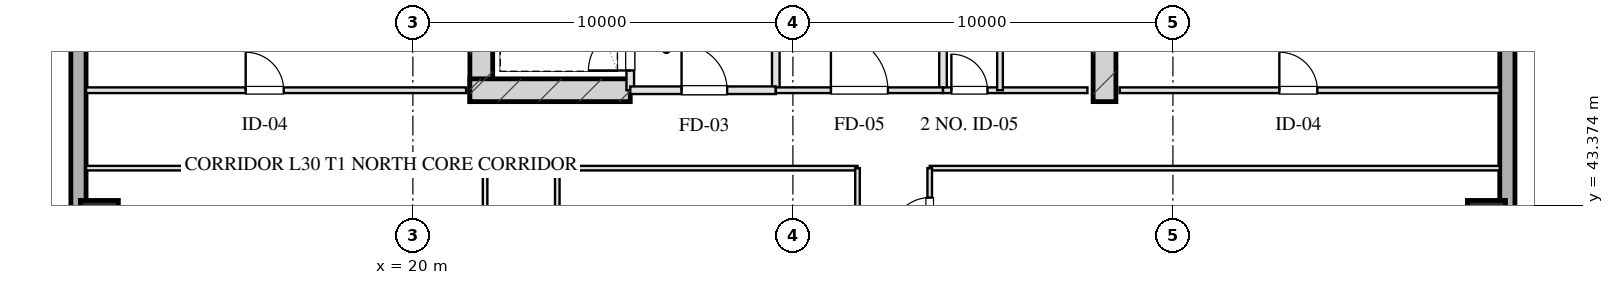
"""IFC4 building model, lengths in metres.
Left out: names, types, materials, properties, quantities, classifications, styles, units other than length and angle.
Written with IfcOpenShell. Run it as: python <this file> out.ifc"""

import sys

from ifc_helpers import new_model, si_unit, direction, frame, frame_2d, origin, origin_2d, place, context, subcontext, project, spatial, rectangle, hollow_rectangle, extrude, element, fill, save


model = new_model("IFC4")
c1 = context("Model", 3, precision=1e-05, world=origin(), true_north=direction((0.0, 1.0)))
c2 = subcontext(c1, "Body", "Model", "MODEL_VIEW")
j1 = project(units=[si_unit("LENGTHUNIT", "METRE"), si_unit("PLANEANGLEUNIT", "RADIAN")], contexts=[c1])
p1 = place(None, origin())
s1 = spatial("IfcSite", under=j1, at=p1, CompositionType="ELEMENT")
p2 = place(p1, origin())
s2 = spatial("IfcBuilding", under=s1, at=p2, CompositionType="ELEMENT")
p3 = place(p2, frame((0.0, 0.0, 117.3)))
s3 = spatial("IfcBuildingStorey", under=s2, at=p3, CompositionType="ELEMENT", Elevation=117.3)
for number, where, z_axis, x_axis in (
    (1, (21.8, 46.1, 0.0), (0.0, 0.0, 1.0), (0.0, 1.0, 0.0)),
    (2, (38.2, 46.1, 0.0), (0.0, 0.0, 1.0), (0.0, 1.0, 0.0)),
):
    element("IfcWall", number, at=place(p3, frame(where, z_axis=z_axis, x_axis=x_axis)), inside=s3, PredefinedType="SHEAR", context=c2, shape_type="SweptSolid", body=[
        extrude(rectangle(XDim=9.48, YDim=0.6, at=frame_2d((4.74, 0.0))), origin(), (0.0, 0.0, 1.0), 3.45),
    ])
p4 = place(p3, frame((21.5, 46.4, 0.0), z_axis=(0.0, 0.0, 1.0), x_axis=(1.0, 0.0, 0.0)))
e3 = element("IfcWall", 3, at=p4, inside=s3, PredefinedType="SHEAR", context=c2, shape_type="SweptSolid", body=[
    extrude(rectangle(XDim=4.22, YDim=0.6, at=frame_2d((2.11, 0.0))), origin(), (0.0, 0.0, 1.0), 3.45),
])
for number, where, z_axis, x_axis in (
    (4, (11.75, 43.0, 0.0), (0.0, 0.0, 1.0), (1.0, 0.0, 0.0)),
    (5, (48.25, 43.0, 0.0), (0.0, 0.0, 1.0), (1.0, 0.0, 0.0)),
):
    element("IfcColumn", number, at=place(p3, frame(where, z_axis=z_axis, x_axis=x_axis)), inside=s3, PredefinedType="COLUMN", context=c2, shape_type="SweptSolid", body=[
        extrude(hollow_rectangle(XDim=1.0, YDim=1.0, WallThickness=0.036, at=origin_2d()), origin(), (0.0, 0.0, 1.0), 3.451),
    ])
p5 = place(p3, frame((11.2, 9.0, 0.0), z_axis=(0.0, 0.0, 1.0), x_axis=(0.0, 1.0, 0.0)))
e6 = element("IfcWall", 6, at=p5, inside=s3, PredefinedType="SOLIDWALL", context=c2, shape_type="SweptSolid", body=[
    extrude(rectangle(XDim=50.0, YDim=0.4, at=frame_2d((25.0, 0.0))), origin(), (0.0, 0.0, 1.0), 2.61),
])
p6 = place(p5, frame((17.4, 0.0, 0.75)))
e7 = element("IfcOpeningElement", 7, at=p6, cuts=e6, PredefinedType="OPENING", context=c2, shape_type="SweptSolid", body=[
    extrude(rectangle(XDim=2.4, YDim=1.46, at=frame_2d((1.2, 0.73))), frame((0.0, 0.21, 0.0), z_axis=(0.0, -1.0, 0.0), x_axis=(1.0, 0.0, 0.0)), (0.0, 0.0, 1.0), 0.42),
])
p7 = place(p5, frame((30.2, 0.0, 0.75)))
e8 = element("IfcOpeningElement", 8, at=p7, cuts=e6, PredefinedType="OPENING", context=c2, shape_type="SweptSolid", body=[
    extrude(rectangle(XDim=2.4, YDim=1.46, at=frame_2d((1.2, 0.73))), frame((0.0, 0.21, 0.0), z_axis=(0.0, -1.0, 0.0), x_axis=(1.0, 0.0, 0.0)), (0.0, 0.0, 1.0), 0.42),
])
p8 = place(p3, frame((48.8, 59.0, 0.0), z_axis=(0.0, 0.0, 1.0), x_axis=(0.0, -1.0, 0.0)))
e9 = element("IfcWall", 9, at=p8, inside=s3, PredefinedType="SOLIDWALL", context=c2, shape_type="SweptSolid", body=[
    extrude(rectangle(XDim=50.0, YDim=0.4, at=frame_2d((25.0, 0.0))), origin(), (0.0, 0.0, 1.0), 2.61),
])
p9 = place(p8, frame((21.2, 0.0, 0.75)))
e10 = element("IfcOpeningElement", 10, at=p9, cuts=e9, PredefinedType="OPENING", context=c2, shape_type="SweptSolid", body=[
    extrude(rectangle(XDim=2.4, YDim=1.46, at=frame_2d((1.2, 0.73))), frame((0.0, 0.21, 0.0), z_axis=(0.0, -1.0, 0.0), x_axis=(1.0, 0.0, 0.0)), (0.0, 0.0, 1.0), 0.42),
])
p10 = place(p3, frame((25.72, 46.4, 0.0), z_axis=(0.0, 0.0, 1.0), x_axis=(0.0, 1.0, 0.0)))
e11 = element("IfcWall", 11, at=p10, inside=s3, PredefinedType="PARTITIONING", context=c2, shape_type="SweptSolid", body=[
    extrude(rectangle(XDim=1.9, YDim=0.2, at=frame_2d((0.95, 0.0))), origin(), (0.0, 0.0, 1.0), 3.175),
])
p11 = place(p10, frame((0.52, 0.0, 0.0)))
e12 = element("IfcOpeningElement", 12, at=p11, cuts=e11, PredefinedType="OPENING", context=c2, shape_type="SweptSolid", body=[
    extrude(rectangle(XDim=1.1, YDim=2.05, at=frame_2d((0.55, 1.025))), frame((0.0, 0.11, 0.0), z_axis=(0.0, -1.0, 0.0), x_axis=(1.0, 0.0, 0.0)), (0.0, 0.0, 1.0), 0.22),
])
p12 = place(p3, frame((29.55, 46.4, 0.0), z_axis=(0.0, 0.0, 1.0), x_axis=(0.0, 1.0, 0.0)))
e13 = element("IfcWall", 13, at=p12, inside=s3, PredefinedType="PARTITIONING", context=c2, shape_type="SweptSolid", body=[
    extrude(rectangle(XDim=8.43, YDim=0.2, at=frame_2d((4.215, 0.0))), origin(), (0.0, 0.0, 1.0), 3.175),
])
p13 = place(p3, frame((25.72, 46.4, 0.0), z_axis=(0.0, 0.0, 1.0), x_axis=(1.0, 0.0, 0.0)))
e14 = element("IfcWall", 14, at=p13, inside=s3, PredefinedType="PARTITIONING", context=c2, shape_type="SweptSolid", body=[
    extrude(rectangle(XDim=3.83, YDim=0.2, at=frame_2d((1.915, 0.0))), origin(), (0.0, 0.0, 1.0), 3.175),
])
p14 = place(p13, frame((1.35, 0.0, 0.0)))
e15 = element("IfcOpeningElement", 15, at=p14, cuts=e14, PredefinedType="OPENING", context=c2, shape_type="SweptSolid", body=[
    extrude(rectangle(XDim=1.2, YDim=2.05, at=frame_2d((0.6, 1.025))), frame((0.0, 0.11, 0.0), z_axis=(0.0, -1.0, 0.0), x_axis=(1.0, 0.0, 0.0)), (0.0, 0.0, 1.0), 0.22),
])
p15 = place(p3, frame((33.95, 46.4, 0.0), z_axis=(0.0, 0.0, 1.0), x_axis=(0.0, 1.0, 0.0)))
e16 = element("IfcWall", 16, at=p15, inside=s3, PredefinedType="PARTITIONING", context=c2, shape_type="SweptSolid", body=[
    extrude(rectangle(XDim=8.43, YDim=0.2, at=frame_2d((4.215, 0.0))), origin(), (0.0, 0.0, 1.0), 3.175),
])
p16 = place(p3, frame((29.55, 46.4, 0.0), z_axis=(0.0, 0.0, 1.0), x_axis=(1.0, 0.0, 0.0)))
e17 = element("IfcWall", 17, at=p16, inside=s3, PredefinedType="PARTITIONING", context=c2, shape_type="SweptSolid", body=[
    extrude(rectangle(XDim=4.4, YDim=0.15, at=frame_2d((2.2, 0.0))), origin(), (0.0, 0.0, 1.0), 3.175),
])
p17 = place(p16, frame((1.45, 0.0, 0.0)))
e18 = element("IfcOpeningElement", 18, at=p17, cuts=e17, PredefinedType="OPENING", context=c2, shape_type="SweptSolid", body=[
    extrude(rectangle(XDim=1.5, YDim=2.05, at=frame_2d((0.75, 1.025))), frame((0.0, 0.085, 0.0), z_axis=(0.0, -1.0, 0.0), x_axis=(1.0, 0.0, 0.0)), (0.0, 0.0, 1.0), 0.17),
])
p18 = place(p3, frame((33.95, 46.4, 0.0), z_axis=(0.0, 0.0, 1.0), x_axis=(1.0, 0.0, 0.0)))
e19 = element("IfcWall", 19, at=p18, inside=s3, PredefinedType="PARTITIONING", context=c2, shape_type="SweptSolid", body=[
    extrude(rectangle(XDim=3.8, YDim=0.15, at=frame_2d((1.9, 0.0))), origin(), (0.0, 0.0, 1.0), 3.175),
])
p19 = place(p18, frame((0.22, 0.0, 0.0)))
e20 = element("IfcOpeningElement", 20, at=p19, cuts=e19, PredefinedType="OPENING", context=c2, shape_type="SweptSolid", body=[
    extrude(rectangle(XDim=0.95, YDim=2.05, at=frame_2d((0.475, 1.025))), frame((0.0, 0.085, 0.0), z_axis=(0.0, -1.0, 0.0), x_axis=(1.0, 0.0, 0.0)), (0.0, 0.0, 1.0), 0.17),
])
p20 = place(p3, frame((35.45, 46.4, 0.0), z_axis=(0.0, 0.0, 1.0), x_axis=(0.0, 1.0, 0.0)))
e21 = element("IfcWall", 21, at=p20, inside=s3, PredefinedType="PARTITIONING", context=c2, shape_type="SweptSolid", body=[
    extrude(rectangle(XDim=8.43, YDim=0.15, at=frame_2d((4.215, 0.0))), origin(), (0.0, 0.0, 1.0), 2.765),
])
p21 = place(p20, frame((2.55, 0.0, 0.0)))
e22 = element("IfcOpeningElement", 22, at=p21, cuts=e21, PredefinedType="OPENING", context=c2, shape_type="SweptSolid", body=[
    extrude(rectangle(XDim=0.95, YDim=2.05, at=frame_2d((0.475, 1.025))), frame((0.0, 0.085, 0.0), z_axis=(0.0, -1.0, 0.0), x_axis=(1.0, 0.0, 0.0)), (0.0, 0.0, 1.0), 0.17),
])
p22 = place(p20, frame((4.7, 0.0, 0.0)))
e23 = element("IfcOpeningElement", 23, at=p22, cuts=e21, PredefinedType="OPENING", context=c2, shape_type="SweptSolid", body=[
    extrude(rectangle(XDim=0.9, YDim=2.05, at=frame_2d((0.45, 1.025))), frame((0.0, 0.085, 0.0), z_axis=(0.0, -1.0, 0.0), x_axis=(1.0, 0.0, 0.0)), (0.0, 0.0, 1.0), 0.17),
])
p23 = place(p20, frame((6.8, 0.0, 0.0)))
e24 = element("IfcOpeningElement", 24, at=p23, cuts=e21, PredefinedType="OPENING", context=c2, shape_type="SweptSolid", body=[
    extrude(rectangle(XDim=0.9, YDim=2.05, at=frame_2d((0.45, 1.025))), frame((0.0, 0.085, 0.0), z_axis=(0.0, -1.0, 0.0), x_axis=(1.0, 0.0, 0.0)), (0.0, 0.0, 1.0), 0.17),
])
p24 = place(p3, frame((11.4, 46.4, 0.0), z_axis=(0.0, 0.0, 1.0), x_axis=(1.0, 0.0, 0.0)))
e25 = element("IfcWall", 25, at=p24, inside=s3, PredefinedType="PARTITIONING", context=c2, shape_type="SweptSolid", body=[
    extrude(rectangle(XDim=10.0, YDim=0.15, at=frame_2d((5.0, 0.0))), origin(), (0.0, 0.0, 1.0), 3.175),
])
p25 = place(p24, frame((4.2, 0.0, 0.0)))
e26 = element("IfcOpeningElement", 26, at=p25, cuts=e25, PredefinedType="OPENING", context=c2, shape_type="SweptSolid", body=[
    extrude(rectangle(XDim=1.0, YDim=2.05, at=frame_2d((0.5, 1.025))), frame((0.0, 0.085, 0.0), z_axis=(0.0, -1.0, 0.0), x_axis=(1.0, 0.0, 0.0)), (0.0, 0.0, 1.0), 0.17),
])
p26 = place(p3, frame((38.6, 46.4, 0.0), z_axis=(0.0, 0.0, 1.0), x_axis=(1.0, 0.0, 0.0)))
e27 = element("IfcWall", 27, at=p26, inside=s3, PredefinedType="PARTITIONING", context=c2, shape_type="SweptSolid", body=[
    extrude(rectangle(XDim=10.0, YDim=0.15, at=frame_2d((5.0, 0.0))), origin(), (0.0, 0.0, 1.0), 3.175),
])
p27 = place(p26, frame((4.2, 0.0, 0.0)))
e28 = element("IfcOpeningElement", 28, at=p27, cuts=e27, PredefinedType="OPENING", context=c2, shape_type="SweptSolid", body=[
    extrude(rectangle(XDim=1.0, YDim=2.05, at=frame_2d((0.5, 1.025))), frame((0.0, 0.085, 0.0), z_axis=(0.0, -1.0, 0.0), x_axis=(1.0, 0.0, 0.0)), (0.0, 0.0, 1.0), 0.17),
])
p28 = place(p3, frame((11.4, 44.35, 0.0), z_axis=(0.0, 0.0, 1.0), x_axis=(1.0, 0.0, 0.0)))
e29 = element("IfcWall", 29, at=p28, inside=s3, PredefinedType="PARTITIONING", context=c2, shape_type="SweptSolid", body=[
    extrude(rectangle(XDim=10.5, YDim=0.12, at=frame_2d((5.25, 0.0))), origin(), (0.0, 0.0, 1.0), 3.175),
])
p29 = place(p3, frame((23.8, 44.35, 0.0), z_axis=(0.0, 0.0, 1.0), x_axis=(1.0, 0.0, 0.0)))
e30 = element("IfcWall", 30, at=p29, inside=s3, PredefinedType="PARTITIONING", context=c2, shape_type="SweptSolid", body=[
    extrude(rectangle(XDim=7.9, YDim=0.12, at=frame_2d((3.95, 0.0))), origin(), (0.0, 0.0, 1.0), 3.175),
])
p30 = place(p3, frame((33.6, 44.35, 0.0), z_axis=(0.0, 0.0, 1.0), x_axis=(1.0, 0.0, 0.0)))
e31 = element("IfcWall", 31, at=p30, inside=s3, PredefinedType="PARTITIONING", context=c2, shape_type="SweptSolid", body=[
    extrude(rectangle(XDim=15.0, YDim=0.12, at=frame_2d((7.5, 0.0))), origin(), (0.0, 0.0, 1.0), 3.175),
])
p31 = place(p3, frame((21.9, 23.65, 0.0), z_axis=(0.0, 0.0, 1.0), x_axis=(0.0, 1.0, 0.0)))
e32 = element("IfcWall", 32, at=p31, inside=s3, PredefinedType="PARTITIONING", context=c2, shape_type="SweptSolid", body=[
    extrude(rectangle(XDim=20.7, YDim=0.12, at=frame_2d((10.35, 0.0))), origin(), (0.0, 0.0, 1.0), 3.175),
])
p32 = place(p31, frame((2.675, 0.0, 0.0)))
e33 = element("IfcOpeningElement", 33, at=p32, cuts=e32, PredefinedType="OPENING", context=c2, shape_type="SweptSolid", body=[
    extrude(rectangle(XDim=1.05, YDim=2.05, at=frame_2d((0.525, 1.025))), frame((0.0, 0.07, 0.0), z_axis=(0.0, -1.0, 0.0), x_axis=(1.0, 0.0, 0.0)), (0.0, 0.0, 1.0), 0.14),
])
p33 = place(p31, frame((9.85, 0.0, 0.0)))
e34 = element("IfcOpeningElement", 34, at=p33, cuts=e32, PredefinedType="OPENING", context=c2, shape_type="SweptSolid", body=[
    extrude(rectangle(XDim=1.0, YDim=2.05, at=frame_2d((0.5, 1.025))), frame((0.0, 0.07, 0.0), z_axis=(0.0, -1.0, 0.0), x_axis=(1.0, 0.0, 0.0)), (0.0, 0.0, 1.0), 0.14),
])
p34 = place(p31, frame((17.025, 0.0, 0.0)))
e35 = element("IfcOpeningElement", 35, at=p34, cuts=e32, PredefinedType="OPENING", context=c2, shape_type="SweptSolid", body=[
    extrude(rectangle(XDim=1.0, YDim=2.05, at=frame_2d((0.5, 1.025))), frame((0.0, 0.07, 0.0), z_axis=(0.0, -1.0, 0.0), x_axis=(1.0, 0.0, 0.0)), (0.0, 0.0, 1.0), 0.14),
])
p35 = place(p3, frame((23.8, 23.65, 0.0), z_axis=(0.0, 0.0, 1.0), x_axis=(0.0, 1.0, 0.0)))
e36 = element("IfcWall", 36, at=p35, inside=s3, PredefinedType="PARTITIONING", context=c2, shape_type="SweptSolid", body=[
    extrude(rectangle(XDim=20.7, YDim=0.12, at=frame_2d((10.35, 0.0))), origin(), (0.0, 0.0, 1.0), 3.175),
])
p36 = place(p35, frame((2.857, 0.0, 0.0)))
e37 = element("IfcOpeningElement", 37, at=p36, cuts=e36, PredefinedType="OPENING", context=c2, shape_type="SweptSolid", body=[
    extrude(rectangle(XDim=1.1, YDim=2.05, at=frame_2d((0.55, 1.025))), frame((0.0, 0.07, 0.0), z_axis=(0.0, -1.0, 0.0), x_axis=(1.0, 0.0, 0.0)), (0.0, 0.0, 1.0), 0.14),
])
p37 = place(p35, frame((17.189, 0.0, 0.0)))
e38 = element("IfcOpeningElement", 38, at=p37, cuts=e36, PredefinedType="OPENING", context=c2, shape_type="SweptSolid", body=[
    extrude(rectangle(XDim=1.1, YDim=2.05, at=frame_2d((0.55, 1.025))), frame((0.0, 0.07, 0.0), z_axis=(0.0, -1.0, 0.0), x_axis=(1.0, 0.0, 0.0)), (0.0, 0.0, 1.0), 0.14),
])
p38 = place(p3, frame((31.7, 23.65, 0.0), z_axis=(0.0, 0.0, 1.0), x_axis=(0.0, 1.0, 0.0)))
e39 = element("IfcWall", 39, at=p38, inside=s3, PredefinedType="PARTITIONING", context=c2, shape_type="SweptSolid", body=[
    extrude(rectangle(XDim=20.7, YDim=0.12, at=frame_2d((10.35, 0.0))), origin(), (0.0, 0.0, 1.0), 3.175),
])
p39 = place(p38, frame((9.696, 0.0, 0.0)))
e40 = element("IfcOpeningElement", 40, at=p39, cuts=e39, PredefinedType="OPENING", context=c2, shape_type="SweptSolid", body=[
    extrude(rectangle(XDim=1.1, YDim=2.05, at=frame_2d((0.55, 1.025))), frame((0.0, 0.07, 0.0), z_axis=(0.0, -1.0, 0.0), x_axis=(1.0, 0.0, 0.0)), (0.0, 0.0, 1.0), 0.14),
])
p40 = place(p3, frame((33.6, 23.65, 0.0), z_axis=(0.0, 0.0, 1.0), x_axis=(0.0, 1.0, 0.0)))
e41 = element("IfcWall", 41, at=p40, inside=s3, PredefinedType="PARTITIONING", context=c2, shape_type="SweptSolid", body=[
    extrude(rectangle(XDim=20.7, YDim=0.12, at=frame_2d((10.35, 0.0))), origin(), (0.0, 0.0, 1.0), 3.175),
])
p41 = place(p40, frame((0.775, 0.0, 0.0)))
e42 = element("IfcOpeningElement", 42, at=p41, cuts=e41, PredefinedType="OPENING", context=c2, shape_type="SweptSolid", body=[
    extrude(rectangle(XDim=1.0, YDim=2.05, at=frame_2d((0.5, 1.025))), frame((0.0, 0.07, 0.0), z_axis=(0.0, -1.0, 0.0), x_axis=(1.0, 0.0, 0.0)), (0.0, 0.0, 1.0), 0.14),
])
p42 = place(p40, frame((3.95, 0.0, 0.0)))
e43 = element("IfcOpeningElement", 43, at=p42, cuts=e41, PredefinedType="OPENING", context=c2, shape_type="SweptSolid", body=[
    extrude(rectangle(XDim=1.05, YDim=2.05, at=frame_2d((0.525, 1.025))), frame((0.0, 0.07, 0.0), z_axis=(0.0, -1.0, 0.0), x_axis=(1.0, 0.0, 0.0)), (0.0, 0.0, 1.0), 0.14),
])
p43 = place(p40, frame((8.19, 0.0, 0.0)))
e44 = element("IfcOpeningElement", 44, at=p43, cuts=e41, PredefinedType="OPENING", context=c2, shape_type="SweptSolid", body=[
    extrude(rectangle(XDim=1.0, YDim=2.05, at=frame_2d((0.5, 1.025))), frame((0.0, 0.07, 0.0), z_axis=(0.0, -1.0, 0.0), x_axis=(1.0, 0.0, 0.0)), (0.0, 0.0, 1.0), 0.14),
])
p44 = place(p40, frame((12.257, 0.0, 0.0)))
e45 = element("IfcOpeningElement", 45, at=p44, cuts=e41, PredefinedType="OPENING", context=c2, shape_type="SweptSolid", body=[
    extrude(rectangle(XDim=1.0, YDim=2.05, at=frame_2d((0.5, 1.025))), frame((0.0, 0.07, 0.0), z_axis=(0.0, -1.0, 0.0), x_axis=(1.0, 0.0, 0.0)), (0.0, 0.0, 1.0), 0.14),
])
p45 = place(p40, frame((15.816, 0.0, 0.0)))
e46 = element("IfcOpeningElement", 46, at=p45, cuts=e41, PredefinedType="OPENING", context=c2, shape_type="SweptSolid", body=[
    extrude(rectangle(XDim=1.0, YDim=2.05, at=frame_2d((0.5, 1.025))), frame((0.0, 0.07, 0.0), z_axis=(0.0, -1.0, 0.0), x_axis=(1.0, 0.0, 0.0)), (0.0, 0.0, 1.0), 0.14),
])
p46 = place(p40, frame((18.925, 0.0, 0.0)))
e47 = element("IfcOpeningElement", 47, at=p46, cuts=e41, PredefinedType="OPENING", context=c2, shape_type="SweptSolid", body=[
    extrude(rectangle(XDim=1.0, YDim=2.05, at=frame_2d((0.5, 1.025))), frame((0.0, 0.07, 0.0), z_axis=(0.0, -1.0, 0.0), x_axis=(1.0, 0.0, 0.0)), (0.0, 0.0, 1.0), 0.14),
])
p47 = place(p11, origin())
e48 = element("IfcDoor", 48, at=p47, inside=s3, OperationType="SINGLE_SWING_LEFT", PredefinedType="DOOR", context=c2, shape_type="SweptSolid", body=[
    extrude(rectangle(XDim=1.1, YDim=2.05, at=frame_2d((0.55, 1.025))), frame((0.0, 0.025, 0.0), z_axis=(0.0, -1.0, 0.0), x_axis=(1.0, 0.0, 0.0)), (0.0, 0.0, 1.0), 0.05),
])
fill(e12, e48)
p48 = place(p14, origin())
e49 = element("IfcDoor", 49, at=p48, inside=s3, OperationType="SINGLE_SWING_LEFT", PredefinedType="DOOR", context=c2, shape_type="SweptSolid", body=[
    extrude(rectangle(XDim=1.2, YDim=2.05, at=frame_2d((0.6, 1.025))), frame((0.0, 0.025, 0.0), z_axis=(0.0, -1.0, 0.0), x_axis=(1.0, 0.0, 0.0)), (0.0, 0.0, 1.0), 0.05),
])
fill(e15, e49)
p49 = place(p17, origin())
e50 = element("IfcDoor", 50, at=p49, inside=s3, OperationType="SINGLE_SWING_LEFT", PredefinedType="DOOR", context=c2, shape_type="SweptSolid", body=[
    extrude(rectangle(XDim=1.5, YDim=2.05, at=frame_2d((0.75, 1.025))), frame((0.0, 0.025, 0.0), z_axis=(0.0, -1.0, 0.0), x_axis=(1.0, 0.0, 0.0)), (0.0, 0.0, 1.0), 0.05),
])
fill(e18, e50)
p50 = place(p19, origin())
e51 = element("IfcDoor", 51, at=p50, inside=s3, OperationType="SINGLE_SWING_LEFT", PredefinedType="DOOR", context=c2, shape_type="SweptSolid", body=[
    extrude(rectangle(XDim=0.95, YDim=2.05, at=frame_2d((0.475, 1.025))), frame((0.0, 0.025, 0.0), z_axis=(0.0, -1.0, 0.0), x_axis=(1.0, 0.0, 0.0)), (0.0, 0.0, 1.0), 0.05),
])
fill(e20, e51)
p51 = place(p25, origin())
e52 = element("IfcDoor", 52, at=p51, inside=s3, OperationType="SINGLE_SWING_LEFT", PredefinedType="DOOR", context=c2, shape_type="SweptSolid", body=[
    extrude(rectangle(XDim=1.0, YDim=2.05, at=frame_2d((0.5, 1.025))), frame((0.0, 0.025, 0.0), z_axis=(0.0, -1.0, 0.0), x_axis=(1.0, 0.0, 0.0)), (0.0, 0.0, 1.0), 0.05),
])
fill(e26, e52)
p52 = place(p27, origin())
e53 = element("IfcDoor", 53, at=p52, inside=s3, OperationType="SINGLE_SWING_LEFT", PredefinedType="DOOR", context=c2, shape_type="SweptSolid", body=[
    extrude(rectangle(XDim=1.0, YDim=2.05, at=frame_2d((0.5, 1.025))), frame((0.0, 0.025, 0.0), z_axis=(0.0, -1.0, 0.0), x_axis=(1.0, 0.0, 0.0)), (0.0, 0.0, 1.0), 0.05),
])
fill(e28, e53)
p53 = place(p46, origin())
e54 = element("IfcDoor", 54, at=p53, inside=s3, OperationType="SINGLE_SWING_LEFT", PredefinedType="DOOR", context=c2, shape_type="SweptSolid", body=[
    extrude(rectangle(XDim=1.0, YDim=2.05, at=frame_2d((0.5, 1.025))), frame((0.0, 0.025, 0.0), z_axis=(0.0, -1.0, 0.0), x_axis=(1.0, 0.0, 0.0)), (0.0, 0.0, 1.0), 0.05),
])
fill(e47, e54)
save(model, sys.argv[1])
